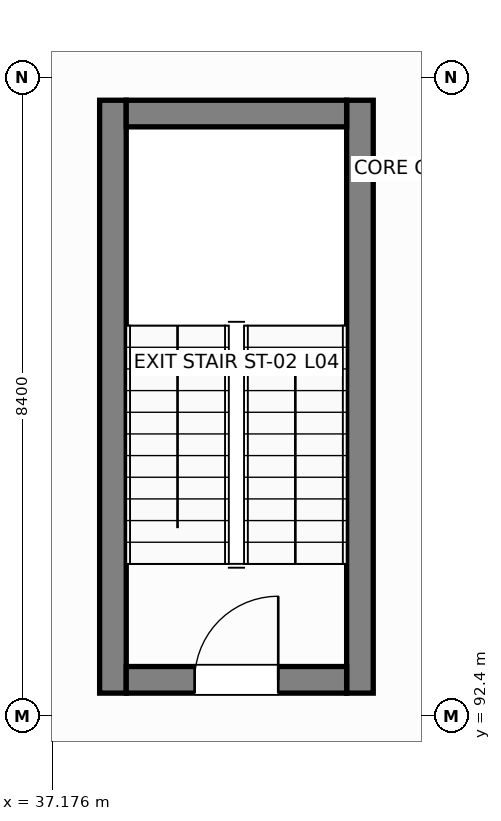
"""IFC4 building model, lengths in metres.
Left out: names, types, materials, properties, quantities, classifications, styles, units other than length and angle.
Written with IfcOpenShell. Run it as: python <this file> out.ifc"""

import sys

from ifc_helpers import new_model, si_unit, direction, frame, frame_2d, origin, place, context, subcontext, project, spatial, rectangle, extrude, element, fill, save


model = new_model("IFC4")
c1 = context("Model", 3, precision=1e-05, world=origin(), true_north=direction((0.0, 1.0)))
c2 = subcontext(c1, "Body", "Model", "MODEL_VIEW")
j1 = project(units=[si_unit("LENGTHUNIT", "METRE"), si_unit("PLANEANGLEUNIT", "RADIAN")], contexts=[c1])
p1 = place(None, origin())
s1 = spatial("IfcSite", under=j1, at=p1, CompositionType="ELEMENT")
p2 = place(p1, origin())
s2 = spatial("IfcBuilding", under=s1, at=p2, CompositionType="ELEMENT")
p3 = place(p2, frame((0.0, 0.0, 17.4)))
s3 = spatial("IfcBuildingStorey", under=s2, at=p3, CompositionType="ELEMENT", Elevation=17.4)
for number, where, z_axis, x_axis in (
    (1, (37.975, 92.7, 0.0), (0.0, 0.0, 1.0), (0.0, 1.0, 0.0)),
    (2, (41.225, 92.7, 0.0), (0.0, 0.0, 1.0), (0.0, 1.0, 0.0)),
):
    element("IfcWall", number, at=place(p3, frame(where, z_axis=z_axis, x_axis=x_axis)), inside=s3, PredefinedType="SHEAR", context=c2, shape_type="SweptSolid", body=[
        extrude(rectangle(XDim=7.8, YDim=0.35, at=frame_2d((3.9, 0.0))), origin(), (0.0, 0.0, 1.0), 3.99),
    ])
p4 = place(p3, frame((38.15, 100.325, 0.0), z_axis=(0.0, 0.0, 1.0), x_axis=(1.0, 0.0, 0.0)))
e3 = element("IfcWall", 3, at=p4, inside=s3, PredefinedType="SHEAR", context=c2, shape_type="SweptSolid", body=[
    extrude(rectangle(XDim=2.9, YDim=0.35, at=frame_2d((1.45, 0.0))), origin(), (0.0, 0.0, 1.0), 3.99),
])
p5 = place(p3, frame((38.15, 92.875, 0.0), z_axis=(0.0, 0.0, 1.0), x_axis=(1.0, 0.0, 0.0)))
e4 = element("IfcWall", 4, at=p5, inside=s3, PredefinedType="SHEAR", context=c2, shape_type="SweptSolid", body=[
    extrude(rectangle(XDim=2.9, YDim=0.35, at=frame_2d((1.45, 0.0))), origin(), (0.0, 0.0, 1.0), 3.99),
])
p6 = place(p5, frame((0.9, 0.0, 0.0)))
e5 = element("IfcOpeningElement", 5, at=p6, cuts=e4, PredefinedType="OPENING", context=c2, shape_type="SweptSolid", body=[
    extrude(rectangle(XDim=1.1, YDim=2.15, at=frame_2d((0.55, 1.075))), frame((0.0, 0.185, 0.0), z_axis=(0.0, -1.0, 0.0), x_axis=(1.0, 0.0, 0.0)), (0.0, 0.0, 1.0), 0.37),
])
p7 = place(p6, origin())
e6 = element("IfcDoor", 6, at=p7, inside=s3, OperationType="SINGLE_SWING_RIGHT", PredefinedType="DOOR", context=c2, shape_type="SweptSolid", body=[
    extrude(rectangle(XDim=1.1, YDim=2.15, at=frame_2d((0.55, 1.075))), frame((0.0, 0.025, 0.0), z_axis=(0.0, -1.0, 0.0), x_axis=(1.0, 0.0, 0.0)), (0.0, 0.0, 1.0), 0.05),
])
fill(e5, e6)
save(model, sys.argv[1])
